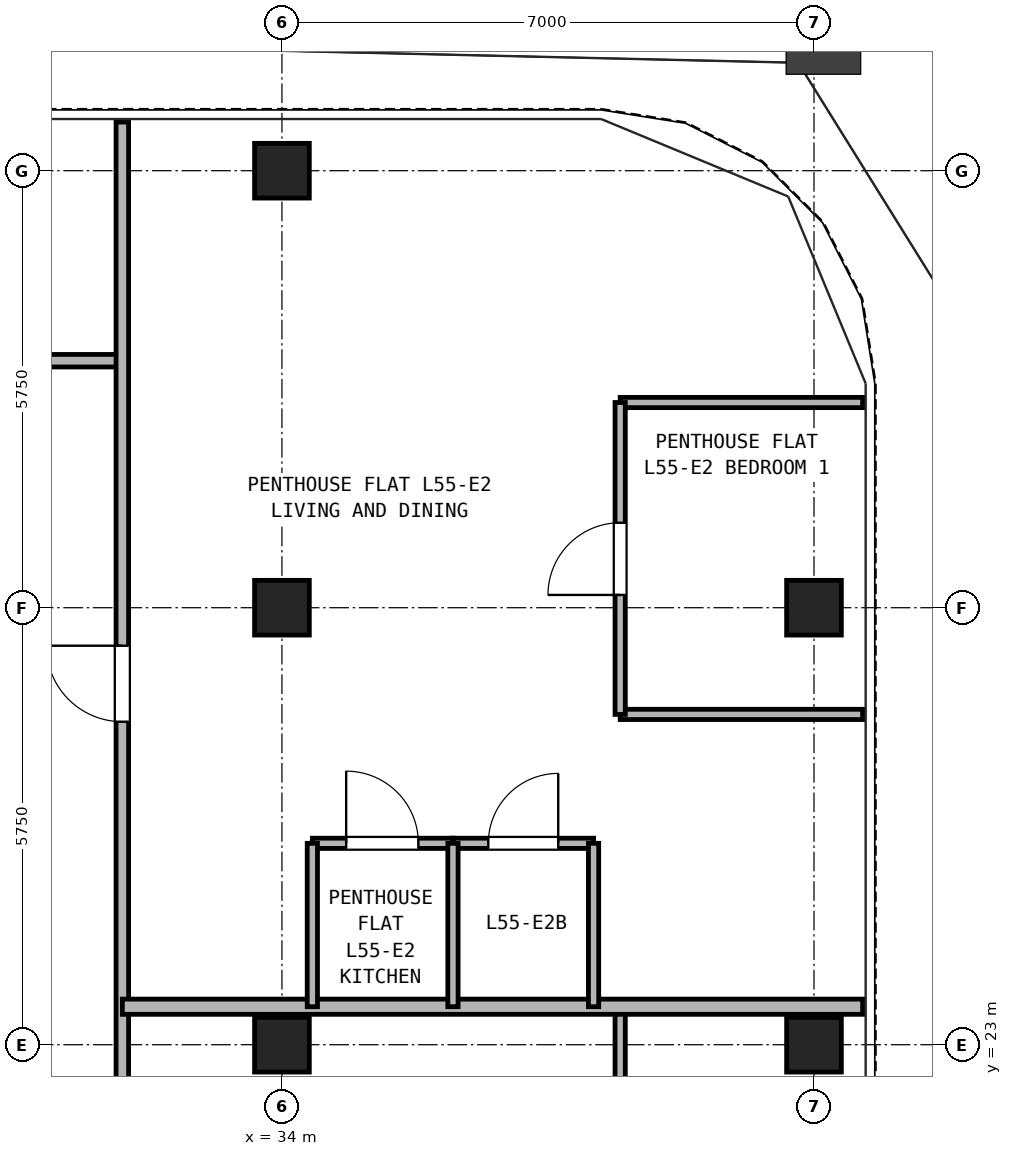
"""IFC4 building model, lengths in metres.
Left out: names, types, materials, properties, quantities, classifications, styles, units other than length and angle.
Written with IfcOpenShell. Run it as: python <this file> out.ifc"""

import sys

from ifc_helpers import new_model, si_unit, direction, frame, frame_2d, origin, origin_2d, place, context, subcontext, project, spatial, rectangle, hollow_rectangle, extrude, source, transform, mapped, element, fill, save


model = new_model("IFC4")
c1 = context("Model", 3, precision=1e-05, world=origin(), true_north=direction((0.0, 1.0)))
c2 = subcontext(c1, "Body", "Model", "MODEL_VIEW")
j1 = project(units=[si_unit("LENGTHUNIT", "METRE"), si_unit("PLANEANGLEUNIT", "RADIAN")], contexts=[c1])
p1 = place(None, origin())
s1 = spatial("IfcSite", under=j1, at=p1, CompositionType="ELEMENT")
p2 = place(p1, origin())
s2 = spatial("IfcBuilding", under=s1, at=p2, CompositionType="ELEMENT")
p3 = place(p2, frame((0.0, 0.0, 196.4)))
s3 = spatial("IfcBuildingStorey", under=s2, at=p3, CompositionType="ELEMENT", Elevation=196.4)
m1 = source(origin(), c2, "Body", "SweptSolid", [
    extrude(hollow_rectangle(XDim=0.72, YDim=0.72, WallThickness=0.04, at=origin_2d()), origin(), (0.0, 0.0, 1.0), 2.95),
])
for number, where, z_axis, x_axis in (
    (1, (34.0, 34.5, 0.0), (0.0, 0.0, 1.0), (1.0, 0.0, 0.0)),
    (2, (41.0, 23.0, 0.0), (0.0, 0.0, 1.0), (1.0, 0.0, 0.0)),
    (3, (41.0, 28.75, 0.0), (0.0, 0.0, 1.0), (1.0, 0.0, 0.0)),
    (4, (34.0, 23.0, 0.0), (0.0, 0.0, 1.0), (1.0, 0.0, 0.0)),
    (5, (34.0, 28.75, 0.0), (0.0, 0.0, 1.0), (1.0, 0.0, 0.0)),
):
    element("IfcColumn", number, at=place(p3, frame(where, z_axis=z_axis, x_axis=x_axis)), inside=s3, PredefinedType="COLUMN", context=c2, shape_type="MappedRepresentation", body=[
        mapped(m1, transform((0.0, 0.0, 0.0), x_axis=(1.0, 0.0, 0.0), y_axis=(0.0, 1.0, 0.0), z_axis=(0.0, 0.0, 1.0), scale=1.0)),
    ])
p4 = place(p3, frame((15.1, 32.0, 0.0), z_axis=(0.0, 0.0, 1.0), x_axis=(1.0, 0.0, 0.0)))
e6 = element("IfcWall", 6, at=p4, inside=s3, PredefinedType="PARTITIONING", context=c2, shape_type="SweptSolid", body=[
    extrude(rectangle(XDim=16.8, YDim=0.165, at=frame_2d((8.4, 0.0))), origin(), (0.0, 0.0, 1.0), 2.95),
])
p5 = place(p4, frame((2.7, 0.0, 0.0)))
e7 = element("IfcOpeningElement", 7, at=p5, cuts=e6, PredefinedType="OPENING", context=c2, shape_type="SweptSolid", body=[
    extrude(rectangle(XDim=0.95, YDim=2.15, at=frame_2d((0.475, 1.075))), frame((0.0, 0.093, 0.0), z_axis=(0.0, -1.0, 0.0), x_axis=(1.0, 0.0, 0.0)), (0.0, 0.0, 1.0), 0.185),
])
p6 = place(p4, frame((8.1, 0.0, 0.0)))
e8 = element("IfcOpeningElement", 8, at=p6, cuts=e6, PredefinedType="OPENING", context=c2, shape_type="SweptSolid", body=[
    extrude(rectangle(XDim=0.95, YDim=2.15, at=frame_2d((0.475, 1.075))), frame((0.0, 0.093, 0.0), z_axis=(0.0, -1.0, 0.0), x_axis=(1.0, 0.0, 0.0)), (0.0, 0.0, 1.0), 0.185),
])
p7 = place(p4, frame((13.3, 0.0, 0.0)))
e9 = element("IfcOpeningElement", 9, at=p7, cuts=e6, PredefinedType="OPENING", context=c2, shape_type="SweptSolid", body=[
    extrude(rectangle(XDim=0.92, YDim=2.1, at=frame_2d((0.46, 1.05))), frame((0.0, 0.093, 0.0), z_axis=(0.0, -1.0, 0.0), x_axis=(1.0, 0.0, 0.0)), (0.0, 0.0, 1.0), 0.185),
])
p8 = place(p3, frame((31.9, 10.6, 0.0), z_axis=(0.0, 0.0, 1.0), x_axis=(0.0, 1.0, 0.0)))
e10 = element("IfcWall", 10, at=p8, inside=s3, PredefinedType="PARTITIONING", context=c2, shape_type="SweptSolid", body=[
    extrude(rectangle(XDim=24.54, YDim=0.165, at=frame_2d((12.27, 0.0))), origin(), (0.0, 0.0, 1.0), 2.95),
])
p9 = place(p8, frame((5.95, 0.0, 0.0)))
e11 = element("IfcOpeningElement", 11, at=p9, cuts=e10, PredefinedType="OPENING", context=c2, shape_type="SweptSolid", body=[
    extrude(rectangle(XDim=1.0, YDim=2.15, at=frame_2d((0.5, 1.075))), frame((0.0, 0.093, 0.0), z_axis=(0.0, -1.0, 0.0), x_axis=(1.0, 0.0, 0.0)), (0.0, 0.0, 1.0), 0.185),
])
p10 = place(p8, frame((16.65, 0.0, 0.0)))
e12 = element("IfcOpeningElement", 12, at=p10, cuts=e10, PredefinedType="OPENING", context=c2, shape_type="SweptSolid", body=[
    extrude(rectangle(XDim=1.0, YDim=2.15, at=frame_2d((0.5, 1.075))), frame((0.0, 0.093, 0.0), z_axis=(0.0, -1.0, 0.0), x_axis=(1.0, 0.0, 0.0)), (0.0, 0.0, 1.0), 0.185),
])
p11 = place(p3, frame((38.45, 19.666, 0.0), z_axis=(0.0, 0.0, 1.0), x_axis=(0.0, 1.0, 0.0)))
e13 = element("IfcWall", 13, at=p11, inside=s3, PredefinedType="PARTITIONING", context=c2, shape_type="SweptSolid", body=[
    extrude(rectangle(XDim=3.834, YDim=0.135, at=frame_2d((1.917, 0.0))), origin(), (0.0, 0.0, 1.0), 2.95),
])
p12 = place(p11, frame((1.437, 0.0, 0.0)))
e14 = element("IfcOpeningElement", 14, at=p12, cuts=e13, PredefinedType="OPENING", context=c2, shape_type="SweptSolid", body=[
    extrude(rectangle(XDim=0.95, YDim=2.15, at=frame_2d((0.475, 1.075))), frame((0.0, 0.077, 0.0), z_axis=(0.0, -1.0, 0.0), x_axis=(1.0, 0.0, 0.0)), (0.0, 0.0, 1.0), 0.155),
])
p13 = place(p3, frame((31.9, 23.5, 0.0), z_axis=(0.0, 0.0, 1.0), x_axis=(1.0, 0.0, 0.0)))
e15 = element("IfcWall", 15, at=p13, inside=s3, PredefinedType="PARTITIONING", context=c2, shape_type="SweptSolid", body=[
    extrude(rectangle(XDim=9.74, YDim=0.2, at=frame_2d((4.87, 0.0))), origin(), (0.0, 0.0, 1.0), 2.95),
])
p14 = place(p3, frame((34.4, 25.65, 0.0), z_axis=(0.0, 0.0, 1.0), x_axis=(1.0, 0.0, 0.0)))
e16 = element("IfcWall", 16, at=p14, inside=s3, PredefinedType="PARTITIONING", context=c2, shape_type="SweptSolid", body=[
    extrude(rectangle(XDim=1.85, YDim=0.135, at=frame_2d((0.925, 0.0))), origin(), (0.0, 0.0, 1.0), 2.583),
])
p15 = place(p14, frame((0.445, 0.0, 0.0)))
e17 = element("IfcOpeningElement", 17, at=p15, cuts=e16, PredefinedType="OPENING", context=c2, shape_type="SweptSolid", body=[
    extrude(rectangle(XDim=0.95, YDim=2.15, at=frame_2d((0.475, 1.075))), frame((0.0, 0.077, 0.0), z_axis=(0.0, -1.0, 0.0), x_axis=(1.0, 0.0, 0.0)), (0.0, 0.0, 1.0), 0.155),
])
p16 = place(p3, frame((36.25, 25.65, 0.0), z_axis=(0.0, 0.0, 1.0), x_axis=(1.0, 0.0, 0.0)))
e18 = element("IfcWall", 18, at=p16, inside=s3, PredefinedType="PARTITIONING", context=c2, shape_type="SweptSolid", body=[
    extrude(rectangle(XDim=1.85, YDim=0.135, at=frame_2d((0.925, 0.0))), origin(), (0.0, 0.0, 1.0), 2.583),
])
p17 = place(p16, frame((0.465, 0.0, 0.0)))
e19 = element("IfcOpeningElement", 19, at=p17, cuts=e18, PredefinedType="OPENING", context=c2, shape_type="SweptSolid", body=[
    extrude(rectangle(XDim=0.92, YDim=2.1, at=frame_2d((0.46, 1.05))), frame((0.0, 0.077, 0.0), z_axis=(0.0, -1.0, 0.0), x_axis=(1.0, 0.0, 0.0)), (0.0, 0.0, 1.0), 0.155),
])
for number, where, z_axis, x_axis in (
    (20, (34.4, 23.5, 0.0), (0.0, 0.0, 1.0), (0.0, 1.0, 0.0)),
    (21, (36.25, 23.5, 0.0), (0.0, 0.0, 1.0), (0.0, 1.0, 0.0)),
    (22, (38.1, 23.5, 0.0), (0.0, 0.0, 1.0), (0.0, 1.0, 0.0)),
):
    element("IfcWall", number, at=place(p3, frame(where, z_axis=z_axis, x_axis=x_axis)), inside=s3, PredefinedType="PARTITIONING", context=c2, shape_type="SweptSolid", body=[
        extrude(rectangle(XDim=2.15, YDim=0.135, at=frame_2d((1.075, 0.0))), origin(), (0.0, 0.0, 1.0), 2.95),
    ])
for number, where, z_axis, x_axis in (
    (23, (38.45, 27.346, 0.0), (0.0, 0.0, 1.0), (1.0, 0.0, 0.0)),
    (24, (38.45, 31.45, 0.0), (0.0, 0.0, 1.0), (1.0, 0.0, 0.0)),
):
    element("IfcWall", number, at=place(p3, frame(where, z_axis=z_axis, x_axis=x_axis)), inside=s3, PredefinedType="PARTITIONING", context=c2, shape_type="SweptSolid", body=[
        extrude(rectangle(XDim=3.19, YDim=0.135, at=frame_2d((1.595, 0.0))), origin(), (0.0, 0.0, 1.0), 2.95),
    ])
p18 = place(p3, frame((38.45, 27.346, 0.0), z_axis=(0.0, 0.0, 1.0), x_axis=(0.0, 1.0, 0.0)))
e25 = element("IfcWall", 25, at=p18, inside=s3, PredefinedType="PARTITIONING", context=c2, shape_type="SweptSolid", body=[
    extrude(rectangle(XDim=4.104, YDim=0.135, at=frame_2d((2.052, 0.0))), origin(), (0.0, 0.0, 1.0), 2.95),
])
p19 = place(p18, frame((1.572, 0.0, 0.0)))
e26 = element("IfcOpeningElement", 26, at=p19, cuts=e25, PredefinedType="OPENING", context=c2, shape_type="SweptSolid", body=[
    extrude(rectangle(XDim=0.95, YDim=2.15, at=frame_2d((0.475, 1.075))), frame((0.0, 0.077, 0.0), z_axis=(0.0, -1.0, 0.0), x_axis=(1.0, 0.0, 0.0)), (0.0, 0.0, 1.0), 0.155),
])
p20 = place(p15, origin())
e27 = element("IfcDoor", 27, at=p20, inside=s3, OperationType="SINGLE_SWING_LEFT", PredefinedType="DOOR", context=c2, shape_type="SweptSolid", body=[
    extrude(rectangle(XDim=0.95, YDim=2.15, at=frame_2d((0.475, 1.075))), frame((0.0, 0.025, 0.0), z_axis=(0.0, -1.0, 0.0), x_axis=(1.0, 0.0, 0.0)), (0.0, 0.0, 1.0), 0.05),
])
fill(e17, e27)
p21 = place(p17, origin())
e28 = element("IfcDoor", 28, at=p21, inside=s3, OperationType="SINGLE_SWING_RIGHT", PredefinedType="DOOR", context=c2, shape_type="SweptSolid", body=[
    extrude(rectangle(XDim=0.92, YDim=2.1, at=frame_2d((0.46, 1.05))), frame((0.0, 0.025, 0.0), z_axis=(0.0, -1.0, 0.0), x_axis=(1.0, 0.0, 0.0)), (0.0, 0.0, 1.0), 0.05),
])
fill(e19, e28)
p22 = place(p19, frame((0.95, 0.0, 0.0), z_axis=(0.0, 0.0, 1.0), x_axis=(-1.0, 0.0, 0.0)))
e29 = element("IfcDoor", 29, at=p22, inside=s3, OperationType="SINGLE_SWING_LEFT", PredefinedType="DOOR", context=c2, shape_type="SweptSolid", body=[
    extrude(rectangle(XDim=0.95, YDim=2.15, at=frame_2d((0.475, 1.075))), frame((0.0, 0.025, 0.0), z_axis=(0.0, -1.0, 0.0), x_axis=(1.0, 0.0, 0.0)), (0.0, 0.0, 1.0), 0.05),
])
fill(e26, e29)
p23 = place(p10, frame((1.0, 0.0, 0.0), z_axis=(0.0, 0.0, 1.0), x_axis=(-1.0, 0.0, 0.0)))
e30 = element("IfcDoor", 30, at=p23, inside=s3, OperationType="SINGLE_SWING_RIGHT", PredefinedType="DOOR", context=c2, shape_type="SweptSolid", body=[
    extrude(rectangle(XDim=1.0, YDim=2.15, at=frame_2d((0.5, 1.075))), frame((0.0, 0.025, 0.0), z_axis=(0.0, -1.0, 0.0), x_axis=(1.0, 0.0, 0.0)), (0.0, 0.0, 1.0), 0.05),
])
fill(e12, e30)
save(model, sys.argv[1])
